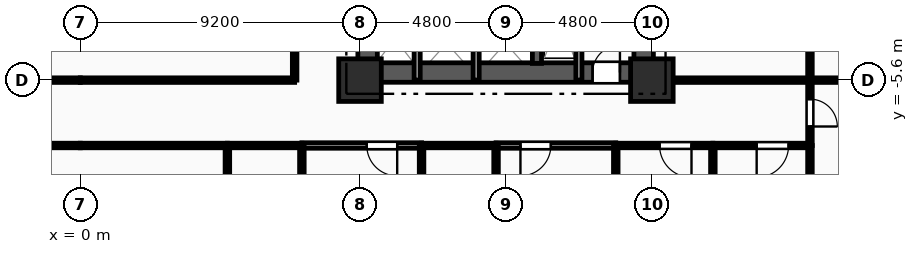
"""IFC4 building model, lengths in metres.
Left out: names, types, materials, properties, quantities, classifications, styles, units other than length and angle.
Written with IfcOpenShell. Run it as: python <this file> out.ifc"""

import sys

from ifc_helpers import new_model, si_unit, direction, frame, frame_2d, origin, origin_2d, place, context, subcontext, project, spatial, rectangle, extrude, element, fill, save


model = new_model("IFC4")
c1 = context("Model", 3, precision=1e-05, world=origin(), true_north=direction((0.0, 1.0)))
c2 = subcontext(c1, "Body", "Model", "MODEL_VIEW")
j1 = project(units=[si_unit("LENGTHUNIT", "METRE"), si_unit("PLANEANGLEUNIT", "RADIAN")], contexts=[c1])
p1 = place(None, origin())
s1 = spatial("IfcSite", under=j1, at=p1, CompositionType="ELEMENT")
p2 = place(p1, origin())
s2 = spatial("IfcBuilding", under=s1, at=p2, CompositionType="ELEMENT")
p3 = place(p2, frame((0.0, 0.0, 18.0)))
s3 = spatial("IfcBuildingStorey", under=s2, at=p3, CompositionType="ELEMENT", Elevation=18.0)
for number, where, z_axis, x_axis in (
    (1, (9.2, -5.6, 0.0), (0.0, 0.0, 1.0), (1.0, 0.0, 0.0)),
    (2, (18.8, -5.6, 0.0), (0.0, 0.0, 1.0), (1.0, 0.0, 0.0)),
):
    element("IfcColumn", number, at=place(p3, frame(where, z_axis=z_axis, x_axis=x_axis)), inside=s3, PredefinedType="COLUMN", context=c2, shape_type="SweptSolid", body=[
        extrude(rectangle(XDim=1.4, YDim=1.4, at=origin_2d()), origin(), (0.0, 0.0, 1.0), 4.5),
    ])
p4 = place(p3, frame((9.2, -5.35, 0.0), z_axis=(0.0, 0.0, 1.0), x_axis=(1.0, 0.0, 0.0)))
e3 = element("IfcWall", 3, at=p4, inside=s3, PredefinedType="SHEAR", context=c2, shape_type="SweptSolid", body=[
    extrude(rectangle(XDim=9.6, YDim=0.64, at=frame_2d((4.8, 0.0))), origin(), (0.0, 0.0, 1.0), 4.17),
])
p5 = place(p4, frame((7.65, 0.0, 0.0)))
e4 = element("IfcOpeningElement", 4, at=p5, cuts=e3, PredefinedType="OPENING", context=c2, shape_type="SweptSolid", body=[
    extrude(rectangle(XDim=0.9, YDim=2.1, at=frame_2d((0.45, 1.05))), frame((0.0, 0.33, 0.0), z_axis=(0.0, -1.0, 0.0), x_axis=(1.0, 0.0, 0.0)), (0.0, 0.0, 1.0), 0.66),
])
p6 = place(p3, frame((9.45, -5.05, 0.0), z_axis=(0.0, 0.0, 1.0), x_axis=(0.0, 1.0, 0.0)))
e5 = element("IfcWall", 5, at=p6, inside=s3, PredefinedType="SHEAR", context=c2, shape_type="SweptSolid", body=[
    extrude(rectangle(XDim=10.1, YDim=0.64, at=frame_2d((5.05, 0.0))), origin(), (0.0, 0.0, 1.0), 4.17),
])
p7 = place(p6, frame((7.15, 0.0, 0.0)))
e6 = element("IfcOpeningElement", 6, at=p7, cuts=e5, PredefinedType="OPENING", context=c2, shape_type="SweptSolid", body=[
    extrude(rectangle(XDim=0.9, YDim=2.1, at=frame_2d((0.45, 1.05))), frame((0.0, 0.33, 0.0), z_axis=(0.0, -1.0, 0.0), x_axis=(1.0, 0.0, 0.0)), (0.0, 0.0, 1.0), 0.66),
])
p8 = place(p6, frame((2.4, 0.0, 0.0)))
e7 = element("IfcOpeningElement", 7, at=p8, cuts=e5, PredefinedType="OPENING", context=c2, shape_type="SweptSolid", body=[
    extrude(rectangle(XDim=1.2, YDim=2.15, at=frame_2d((0.6, 1.075))), frame((0.0, 0.33, 0.0), z_axis=(0.0, -1.0, 0.0), x_axis=(1.0, 0.0, 0.0)), (0.0, 0.0, 1.0), 0.66),
])
p9 = place(p3, frame((18.53, -5.05, 0.0), z_axis=(0.0, 0.0, 1.0), x_axis=(0.0, 1.0, 0.0)))
e8 = element("IfcWall", 8, at=p9, inside=s3, PredefinedType="SHEAR", context=c2, shape_type="SweptSolid", body=[
    extrude(rectangle(XDim=10.1, YDim=0.64, at=frame_2d((5.05, 0.0))), origin(), (0.0, 0.0, 1.0), 4.17),
])
p10 = place(p3, frame((15.02, -5.05, 0.0), z_axis=(0.0, 0.0, 1.0), x_axis=(0.0, 1.0, 0.0)))
e9 = element("IfcWall", 9, at=p10, inside=s3, PredefinedType="SHEAR", context=c2, shape_type="SweptSolid", body=[
    extrude(rectangle(XDim=10.1, YDim=0.3, at=frame_2d((5.05, 0.0))), origin(), (0.0, 0.0, 1.0), 4.17),
])
p11 = place(p3, frame((16.4, -2.11, 0.0), z_axis=(0.0, 0.0, 1.0), x_axis=(0.0, -1.0, 0.0)))
e10 = element("IfcWall", 10, at=p11, inside=s3, PredefinedType="PARTITIONING", context=c2, shape_type="SweptSolid", body=[
    extrude(rectangle(XDim=3.49, YDim=0.2, at=frame_2d((1.745, 0.0))), origin(), (0.0, 0.0, 1.0), 4.17),
])
for number, where, z_axis, x_axis in (
    (11, (11.08, -5.6, 0.0), (0.0, 0.0, 1.0), (0.0, 1.0, 0.0)),
    (12, (13.02, -5.6, 0.0), (0.0, 0.0, 1.0), (0.0, 1.0, 0.0)),
):
    element("IfcWall", number, at=place(p3, frame(where, z_axis=z_axis, x_axis=x_axis)), inside=s3, PredefinedType="PARTITIONING", context=c2, shape_type="SweptSolid", body=[
        extrude(rectangle(XDim=2.25, YDim=0.2, at=frame_2d((1.125, 0.0))), origin(), (0.0, 0.0, 1.0), 4.17),
    ])
p12 = place(p3, frame((0.0, -7.75, 0.0), z_axis=(0.0, 0.0, 1.0), x_axis=(-1.0, 0.0, 0.0)))
e13 = element("IfcWall", 13, at=p12, inside=s3, PredefinedType="PARTITIONING", context=c2, shape_type="SweptSolid", body=[
    extrude(rectangle(XDim=1.55, YDim=0.15, at=frame_2d((0.775, 0.0))), origin(), (0.0, 0.0, 1.0), 4.17),
])
p13 = place(p3, frame((-7.05, -5.6, 0.0), z_axis=(0.0, 0.0, 1.0), x_axis=(1.0, 0.0, 0.0)))
e14 = element("IfcWall", 14, at=p13, inside=s3, PredefinedType="PARTITIONING", context=c2, shape_type="SweptSolid", body=[
    extrude(rectangle(XDim=7.05, YDim=0.15, at=frame_2d((3.525, 0.0))), origin(), (0.0, 0.0, 1.0), 3.655),
])
p14 = place(p3, frame((24.0, -5.6, 0.0), z_axis=(0.0, 0.0, 1.0), x_axis=(0.0, -1.0, 0.0)))
e15 = element("IfcWall", 15, at=p14, inside=s3, PredefinedType="PARTITIONING", context=c2, shape_type="SweptSolid", body=[
    extrude(rectangle(XDim=2.15, YDim=0.15, at=frame_2d((1.075, 0.0))), origin(), (0.0, 0.0, 1.0), 4.17),
])
p15 = place(p14, frame((0.625, 0.0, 0.0)))
e16 = element("IfcOpeningElement", 16, at=p15, cuts=e15, PredefinedType="OPENING", context=c2, shape_type="SweptSolid", body=[
    extrude(rectangle(XDim=0.9, YDim=2.1, at=frame_2d((0.45, 1.05))), frame((0.0, 0.085, 0.0), z_axis=(0.0, -1.0, 0.0), x_axis=(1.0, 0.0, 0.0)), (0.0, 0.0, 1.0), 0.17),
])
p16 = place(p3, frame((18.8, -5.6, 0.0), z_axis=(0.0, 0.0, 1.0), x_axis=(1.0, 0.0, 0.0)))
e17 = element("IfcWall", 17, at=p16, inside=s3, PredefinedType="PARTITIONING", context=c2, shape_type="SweptSolid", body=[
    extrude(rectangle(XDim=5.2, YDim=0.15, at=frame_2d((2.6, 0.0))), origin(), (0.0, 0.0, 1.0), 4.17),
])
p17 = place(p3, frame((4.838, -7.75, 0.0), z_axis=(0.0, 0.0, 1.0), x_axis=(-1.0, 0.0, 0.0)))
e18 = element("IfcWall", 18, at=p17, inside=s3, PredefinedType="PARTITIONING", context=c2, shape_type="SweptSolid", body=[
    extrude(rectangle(XDim=4.838, YDim=0.15, at=frame_2d((2.419, 0.0))), origin(), (0.0, 0.0, 1.0), 4.17),
])
p18 = place(p3, frame((11.225, -7.75, 0.0), z_axis=(0.0, 0.0, 1.0), x_axis=(-1.0, 0.0, 0.0)))
e19 = element("IfcWall", 19, at=p18, inside=s3, PredefinedType="PARTITIONING", context=c2, shape_type="SweptSolid", body=[
    extrude(rectangle(XDim=3.937, YDim=0.18, at=frame_2d((1.969, 0.0))), origin(), (0.0, 0.0, 1.0), 4.17),
])
p19 = place(p18, frame((0.802, 0.0, 0.0)))
e20 = element("IfcOpeningElement", 20, at=p19, cuts=e19, PredefinedType="OPENING", context=c2, shape_type="SweptSolid", body=[
    extrude(rectangle(XDim=1.0, YDim=2.15, at=frame_2d((0.5, 1.075))), frame((0.0, 0.1, 0.0), z_axis=(0.0, -1.0, 0.0), x_axis=(1.0, 0.0, 0.0)), (0.0, 0.0, 1.0), 0.2),
])
p20 = place(p3, frame((7.288, -7.75, 0.0), z_axis=(0.0, 0.0, 1.0), x_axis=(-1.0, 0.0, 0.0)))
e21 = element("IfcWall", 21, at=p20, inside=s3, PredefinedType="PLUMBINGWALL", context=c2, shape_type="SweptSolid", body=[
    extrude(rectangle(XDim=2.45, YDim=0.15, at=frame_2d((1.225, 0.0))), origin(), (0.0, 0.0, 1.0), 4.17),
])
p21 = place(p3, frame((17.613, -7.75, 0.0), z_axis=(0.0, 0.0, 1.0), x_axis=(-1.0, 0.0, 0.0)))
e22 = element("IfcWall", 22, at=p21, inside=s3, PredefinedType="PARTITIONING", context=c2, shape_type="SweptSolid", body=[
    extrude(rectangle(XDim=3.938, YDim=0.18, at=frame_2d((1.969, 0.0))), origin(), (0.0, 0.0, 1.0), 4.17),
])
p22 = place(p21, frame((2.136, 0.0, 0.0)))
e23 = element("IfcOpeningElement", 23, at=p22, cuts=e22, PredefinedType="OPENING", context=c2, shape_type="SweptSolid", body=[
    extrude(rectangle(XDim=1.0, YDim=2.15, at=frame_2d((0.5, 1.075))), frame((0.0, 0.1, 0.0), z_axis=(0.0, -1.0, 0.0), x_axis=(1.0, 0.0, 0.0)), (0.0, 0.0, 1.0), 0.2),
])
p23 = place(p3, frame((13.675, -7.75, 0.0), z_axis=(0.0, 0.0, 1.0), x_axis=(-1.0, 0.0, 0.0)))
e24 = element("IfcWall", 24, at=p23, inside=s3, PredefinedType="PLUMBINGWALL", context=c2, shape_type="SweptSolid", body=[
    extrude(rectangle(XDim=2.45, YDim=0.15, at=frame_2d((1.225, 0.0))), origin(), (0.0, 0.0, 1.0), 4.17),
])
p24 = place(p3, frame((20.806, -7.75, 0.0), z_axis=(0.0, 0.0, 1.0), x_axis=(-1.0, 0.0, 0.0)))
e25 = element("IfcWall", 25, at=p24, inside=s3, PredefinedType="PARTITIONING", context=c2, shape_type="SweptSolid", body=[
    extrude(rectangle(XDim=3.193, YDim=0.15, at=frame_2d((1.597, 0.0))), origin(), (0.0, 0.0, 1.0), 4.17),
])
p25 = place(p24, frame((0.703, 0.0, 0.0)))
e26 = element("IfcOpeningElement", 26, at=p25, cuts=e25, PredefinedType="OPENING", context=c2, shape_type="SweptSolid", body=[
    extrude(rectangle(XDim=1.05, YDim=2.15, at=frame_2d((0.525, 1.075))), frame((0.0, 0.085, 0.0), z_axis=(0.0, -1.0, 0.0), x_axis=(1.0, 0.0, 0.0)), (0.0, 0.0, 1.0), 0.17),
])
p26 = place(p3, frame((24.0, -7.75, 0.0), z_axis=(0.0, 0.0, 1.0), x_axis=(-1.0, 0.0, 0.0)))
e27 = element("IfcWall", 27, at=p26, inside=s3, PredefinedType="PARTITIONING", context=c2, shape_type="SweptSolid", body=[
    extrude(rectangle(XDim=3.194, YDim=0.15, at=frame_2d((1.597, 0.0))), origin(), (0.0, 0.0, 1.0), 4.17),
])
p27 = place(p26, frame((0.703, 0.0, 0.0)))
e28 = element("IfcOpeningElement", 28, at=p27, cuts=e27, PredefinedType="OPENING", context=c2, shape_type="SweptSolid", body=[
    extrude(rectangle(XDim=1.05, YDim=2.15, at=frame_2d((0.525, 1.075))), frame((0.0, 0.085, 0.0), z_axis=(0.0, -1.0, 0.0), x_axis=(1.0, 0.0, 0.0)), (0.0, 0.0, 1.0), 0.17),
])
p28 = place(p3, frame((0.0, -5.6, 0.0), z_axis=(0.0, 0.0, 1.0), x_axis=(1.0, 0.0, 0.0)))
e29 = element("IfcWall", 29, at=p28, inside=s3, PredefinedType="PARTITIONING", context=c2, shape_type="SweptSolid", body=[
    extrude(rectangle(XDim=7.05, YDim=0.15, at=frame_2d((3.525, 0.0))), origin(), (0.0, 0.0, 1.0), 3.655),
])
p29 = place(p3, frame((7.05, -5.6, 0.0), z_axis=(0.0, 0.0, 1.0), x_axis=(0.0, 1.0, 0.0)))
e30 = element("IfcWall", 30, at=p29, inside=s3, PredefinedType="PARTITIONING", context=c2, shape_type="SweptSolid", body=[
    extrude(rectangle(XDim=14.1, YDim=0.15, at=frame_2d((7.05, 0.0))), origin(), (0.0, 0.0, 1.0), 4.17),
])
p30 = place(p3, frame((26.65, -5.6, 0.0), z_axis=(0.0, 0.0, 1.0), x_axis=(-1.0, 0.0, 0.0)))
e31 = element("IfcWall", 31, at=p30, inside=s3, PredefinedType="PARTITIONING", context=c2, shape_type="SweptSolid", body=[
    extrude(rectangle(XDim=2.65, YDim=0.15, at=frame_2d((1.325, 0.0))), origin(), (0.0, 0.0, 1.0), 4.17),
])
p31 = place(p30, frame((0.635, 0.0, 0.0)))
e32 = element("IfcOpeningElement", 32, at=p31, cuts=e31, PredefinedType="OPENING", context=c2, shape_type="SweptSolid", body=[
    extrude(rectangle(XDim=1.05, YDim=2.15, at=frame_2d((0.525, 1.075))), frame((0.0, 0.085, 0.0), z_axis=(0.0, -1.0, 0.0), x_axis=(1.0, 0.0, 0.0)), (0.0, 0.0, 1.0), 0.17),
])
p32 = place(p3, frame((24.0, -5.6, 0.0), z_axis=(0.0, 0.0, 1.0), x_axis=(0.0, 1.0, 0.0)))
e33 = element("IfcWall", 33, at=p32, inside=s3, PredefinedType="PARTITIONING", context=c2, shape_type="SweptSolid", body=[
    extrude(rectangle(XDim=14.1, YDim=0.15, at=frame_2d((7.05, 0.0))), origin(), (0.0, 0.0, 1.0), 4.17),
])
p33 = place(p3, frame((24.0, -21.8, 0.0), z_axis=(0.0, 0.0, 1.0), x_axis=(0.0, 1.0, 0.0)))
e34 = element("IfcWall", 34, at=p33, inside=s3, PredefinedType="PARTITIONING", context=c2, shape_type="SweptSolid", body=[
    extrude(rectangle(XDim=14.05, YDim=0.15, at=frame_2d((7.025, 0.0))), origin(), (0.0, 0.0, 1.0), 4.17),
])
for number, where, z_axis, x_axis in (
    (35, (4.838, -7.75, 0.0), (0.0, 0.0, 1.0), (0.0, -1.0, 0.0)),
    (36, (7.288, -9.9, 0.0), (0.0, 0.0, 1.0), (0.0, 1.0, 0.0)),
    (37, (11.225, -7.75, 0.0), (0.0, 0.0, 1.0), (0.0, -1.0, 0.0)),
    (38, (13.675, -9.9, 0.0), (0.0, 0.0, 1.0), (0.0, 1.0, 0.0)),
):
    element("IfcWall", number, at=place(p3, frame(where, z_axis=z_axis, x_axis=x_axis)), inside=s3, PredefinedType="PLUMBINGWALL", context=c2, shape_type="SweptSolid", body=[
        extrude(rectangle(XDim=2.15, YDim=0.15, at=frame_2d((1.075, 0.0))), origin(), (0.0, 0.0, 1.0), 4.17),
    ])
for number, where, z_axis, x_axis in (
    (39, (17.613, -7.75, 0.0), (0.0, 0.0, 1.0), (0.0, -1.0, 0.0)),
    (40, (20.806, -7.75, 0.0), (0.0, 0.0, 1.0), (0.0, -1.0, 0.0)),
):
    element("IfcWall", number, at=place(p3, frame(where, z_axis=z_axis, x_axis=x_axis)), inside=s3, PredefinedType="PARTITIONING", context=c2, shape_type="SweptSolid", body=[
        extrude(rectangle(XDim=14.05, YDim=0.15, at=frame_2d((7.025, 0.0))), origin(), (0.0, 0.0, 1.0), 4.17),
    ])
p34 = place(p5, origin())
e41 = element("IfcDoor", 41, at=p34, inside=s3, OperationType="SINGLE_SWING_RIGHT", PredefinedType="DOOR", context=c2, shape_type="SweptSolid", body=[
    extrude(rectangle(XDim=0.9, YDim=2.1, at=frame_2d((0.45, 1.05))), frame((0.0, 0.025, 0.0), z_axis=(0.0, -1.0, 0.0), x_axis=(1.0, 0.0, 0.0)), (0.0, 0.0, 1.0), 0.05),
])
fill(e4, e41)
p35 = place(p15, origin())
e42 = element("IfcDoor", 42, at=p35, inside=s3, OperationType="SINGLE_SWING_RIGHT", PredefinedType="DOOR", context=c2, shape_type="SweptSolid", body=[
    extrude(rectangle(XDim=0.9, YDim=2.1, at=frame_2d((0.45, 1.05))), frame((0.0, 0.025, 0.0), z_axis=(0.0, -1.0, 0.0), x_axis=(1.0, 0.0, 0.0)), (0.0, 0.0, 1.0), 0.05),
])
fill(e16, e42)
p36 = place(p19, origin())
e43 = element("IfcDoor", 43, at=p36, inside=s3, OperationType="SINGLE_SWING_LEFT", PredefinedType="DOOR", context=c2, shape_type="SweptSolid", body=[
    extrude(rectangle(XDim=1.0, YDim=2.15, at=frame_2d((0.5, 1.075))), frame((0.0, 0.025, 0.0), z_axis=(0.0, -1.0, 0.0), x_axis=(1.0, 0.0, 0.0)), (0.0, 0.0, 1.0), 0.05),
])
fill(e20, e43)
p37 = place(p22, origin())
e44 = element("IfcDoor", 44, at=p37, inside=s3, OperationType="SINGLE_SWING_RIGHT", PredefinedType="DOOR", context=c2, shape_type="SweptSolid", body=[
    extrude(rectangle(XDim=1.0, YDim=2.15, at=frame_2d((0.5, 1.075))), frame((0.0, 0.025, 0.0), z_axis=(0.0, -1.0, 0.0), x_axis=(1.0, 0.0, 0.0)), (0.0, 0.0, 1.0), 0.05),
])
fill(e23, e44)
p38 = place(p25, origin())
e45 = element("IfcDoor", 45, at=p38, inside=s3, OperationType="SINGLE_SWING_LEFT", PredefinedType="DOOR", context=c2, shape_type="SweptSolid", body=[
    extrude(rectangle(XDim=1.05, YDim=2.15, at=frame_2d((0.525, 1.075))), frame((0.0, 0.025, 0.0), z_axis=(0.0, -1.0, 0.0), x_axis=(1.0, 0.0, 0.0)), (0.0, 0.0, 1.0), 0.05),
])
fill(e26, e45)
p39 = place(p27, origin())
e46 = element("IfcDoor", 46, at=p39, inside=s3, OperationType="SINGLE_SWING_RIGHT", PredefinedType="DOOR", context=c2, shape_type="SweptSolid", body=[
    extrude(rectangle(XDim=1.05, YDim=2.15, at=frame_2d((0.525, 1.075))), frame((0.0, 0.025, 0.0), z_axis=(0.0, -1.0, 0.0), x_axis=(1.0, 0.0, 0.0)), (0.0, 0.0, 1.0), 0.05),
])
fill(e28, e46)
save(model, sys.argv[1])
